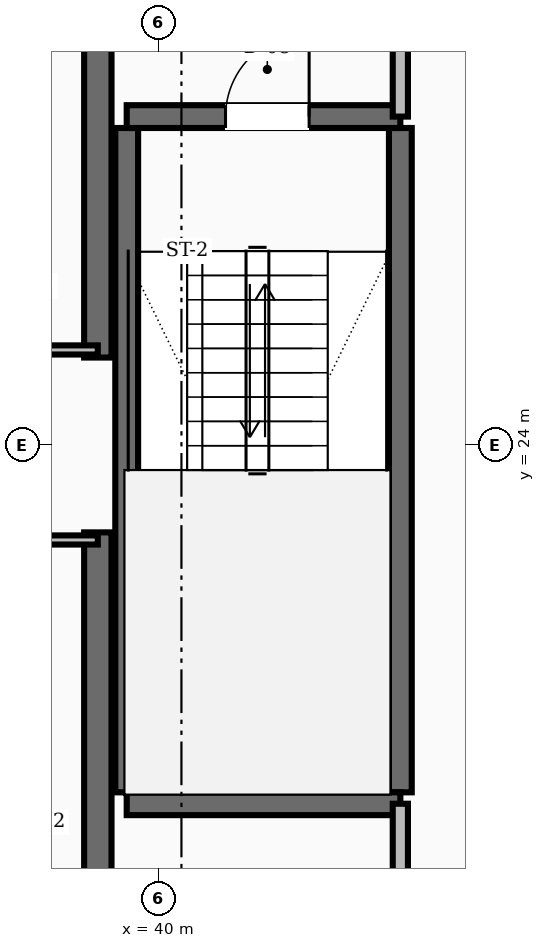
"""IFC4 building model, lengths in metres.
Left out: names, types, materials, properties, quantities, classifications, styles, units other than length and angle.
Written with IfcOpenShell. Run it as: python <this file> out.ifc"""

import sys

from ifc_helpers import new_model, si_unit, direction, frame, frame_2d, origin, place, context, subcontext, project, spatial, rectangle, extrude, element, fill, save


model = new_model("IFC4")
c1 = context("Model", 3, precision=1e-05, world=origin(), true_north=direction((0.0, 1.0)))
c2 = subcontext(c1, "Body", "Model", "MODEL_VIEW")
j1 = project(units=[si_unit("LENGTHUNIT", "METRE"), si_unit("PLANEANGLEUNIT", "RADIAN")], contexts=[c1])
p1 = place(None, origin())
s1 = spatial("IfcSite", under=j1, at=p1, CompositionType="ELEMENT")
p2 = place(p1, origin())
s2 = spatial("IfcBuilding", under=s1, at=p2, CompositionType="ELEMENT")
p3 = place(p2, frame((0.0, 0.0, 138.8)))
s3 = spatial("IfcBuildingStorey", under=s2, at=p3, CompositionType="ELEMENT", Elevation=138.8)
for number, where, z_axis, x_axis in (
    (1, (39.2, 16.55, 0.0), (0.0, 0.0, 1.0), (0.0, 1.0, 0.0)),
    (2, (39.2, 25.15, 0.0), (0.0, 0.0, 1.0), (0.0, 1.0, 0.0)),
):
    element("IfcWall", number, at=place(p3, frame(where, z_axis=z_axis, x_axis=x_axis)), inside=s3, PredefinedType="SHEAR", context=c2, shape_type="SweptSolid", body=[
        extrude(rectangle(XDim=6.3, YDim=0.36, at=frame_2d((3.15, 0.0))), origin(), (0.0, 0.0, 1.0), 3.6),
    ])
for number, where, z_axis, x_axis in (
    (3, (43.18, 19.43, 0.0), (0.0, 0.0, 1.0), (0.0, 1.0, 0.0)),
    (4, (39.58, 19.43, 0.0), (0.0, 0.0, 1.0), (0.0, 1.0, 0.0)),
):
    element("IfcWall", number, at=place(p3, frame(where, z_axis=z_axis, x_axis=x_axis)), inside=s3, PredefinedType="SHEAR", context=c2, shape_type="SweptSolid", body=[
        extrude(rectangle(XDim=8.74, YDim=0.3, at=frame_2d((4.37, 0.0))), origin(), (0.0, 0.0, 1.0), 3.6),
    ])
p4 = place(p3, frame((39.58, 19.28, 0.0), z_axis=(0.0, 0.0, 1.0), x_axis=(1.0, 0.0, 0.0)))
e5 = element("IfcWall", 5, at=p4, inside=s3, PredefinedType="SHEAR", context=c2, shape_type="SweptSolid", body=[
    extrude(rectangle(XDim=3.6, YDim=0.3, at=frame_2d((1.8, 0.0))), origin(), (0.0, 0.0, 1.0), 3.6),
])
p5 = place(p3, frame((39.58, 28.32, 0.0), z_axis=(0.0, 0.0, 1.0), x_axis=(1.0, 0.0, 0.0)))
e6 = element("IfcWall", 6, at=p5, inside=s3, PredefinedType="SHEAR", context=c2, shape_type="SweptSolid", body=[
    extrude(rectangle(XDim=3.6, YDim=0.3, at=frame_2d((1.8, 0.0))), origin(), (0.0, 0.0, 1.0), 3.6),
])
p6 = place(p5, frame((1.3, 0.0, 0.0)))
e7 = element("IfcOpeningElement", 7, at=p6, cuts=e6, PredefinedType="OPENING", context=c2, shape_type="SweptSolid", body=[
    extrude(rectangle(XDim=1.1, YDim=2.1, at=frame_2d((0.55, 1.05))), frame((0.0, 0.16, 0.0), z_axis=(0.0, -1.0, 0.0), x_axis=(1.0, 0.0, 0.0)), (0.0, 0.0, 1.0), 0.32),
])
p7 = place(p3, frame((43.18, 28.32, 0.0), z_axis=(0.0, 0.0, 1.0), x_axis=(0.0, 1.0, 0.0)))
e8 = element("IfcWall", 8, at=p7, inside=s3, PredefinedType="SOLIDWALL", context=c2, shape_type="SweptSolid", body=[
    extrude(rectangle(XDim=3.13, YDim=0.2, at=frame_2d((1.565, 0.0))), origin(), (0.0, 0.0, 1.0), 2.8),
])
p8 = place(p7, frame((1.015, 0.0, 0.0)))
e9 = element("IfcOpeningElement", 9, at=p8, cuts=e8, PredefinedType="OPENING", context=c2, shape_type="SweptSolid", body=[
    extrude(rectangle(XDim=1.1, YDim=2.1, at=frame_2d((0.55, 1.05))), frame((0.0, 0.11, 0.0), z_axis=(0.0, -1.0, 0.0), x_axis=(1.0, 0.0, 0.0)), (0.0, 0.0, 1.0), 0.22),
])
p9 = place(p3, frame((43.18, 16.55, 0.0), z_axis=(0.0, 0.0, 1.0), x_axis=(0.0, 1.0, 0.0)))
e10 = element("IfcWall", 10, at=p9, inside=s3, PredefinedType="SOLIDWALL", context=c2, shape_type="SweptSolid", body=[
    extrude(rectangle(XDim=2.73, YDim=0.2, at=frame_2d((1.365, 0.0))), origin(), (0.0, 0.0, 1.0), 2.8),
])
p10 = place(p9, frame((0.89, 0.0, 0.0)))
e11 = element("IfcOpeningElement", 11, at=p10, cuts=e10, PredefinedType="OPENING", context=c2, shape_type="SweptSolid", body=[
    extrude(rectangle(XDim=0.95, YDim=2.1, at=frame_2d((0.475, 1.05))), frame((0.0, 0.11, 0.0), z_axis=(0.0, -1.0, 0.0), x_axis=(1.0, 0.0, 0.0)), (0.0, 0.0, 1.0), 0.22),
])
for number, where, z_axis, x_axis in (
    (12, (37.4, 25.25, 0.0), (0.0, 0.0, 1.0), (1.0, 0.0, 0.0)),
    (13, (37.4, 22.75, 0.0), (0.0, 0.0, 1.0), (1.0, 0.0, 0.0)),
):
    element("IfcWall", number, at=place(p3, frame(where, z_axis=z_axis, x_axis=x_axis)), inside=s3, PredefinedType="PARTITIONING", context=c2, shape_type="SweptSolid", body=[
        extrude(rectangle(XDim=1.8, YDim=0.12, at=frame_2d((0.9, 0.0))), origin(), (0.0, 0.0, 1.0), 2.8),
    ])
p11 = place(p6, origin())
e14 = element("IfcDoor", 14, at=p11, inside=s3, OperationType="SINGLE_SWING_RIGHT", PredefinedType="DOOR", context=c2, shape_type="SweptSolid", body=[
    extrude(rectangle(XDim=1.1, YDim=2.1, at=frame_2d((0.55, 1.05))), frame((0.0, 0.025, 0.0), z_axis=(0.0, -1.0, 0.0), x_axis=(1.0, 0.0, 0.0)), (0.0, 0.0, 1.0), 0.05),
])
fill(e7, e14)
save(model, sys.argv[1])
